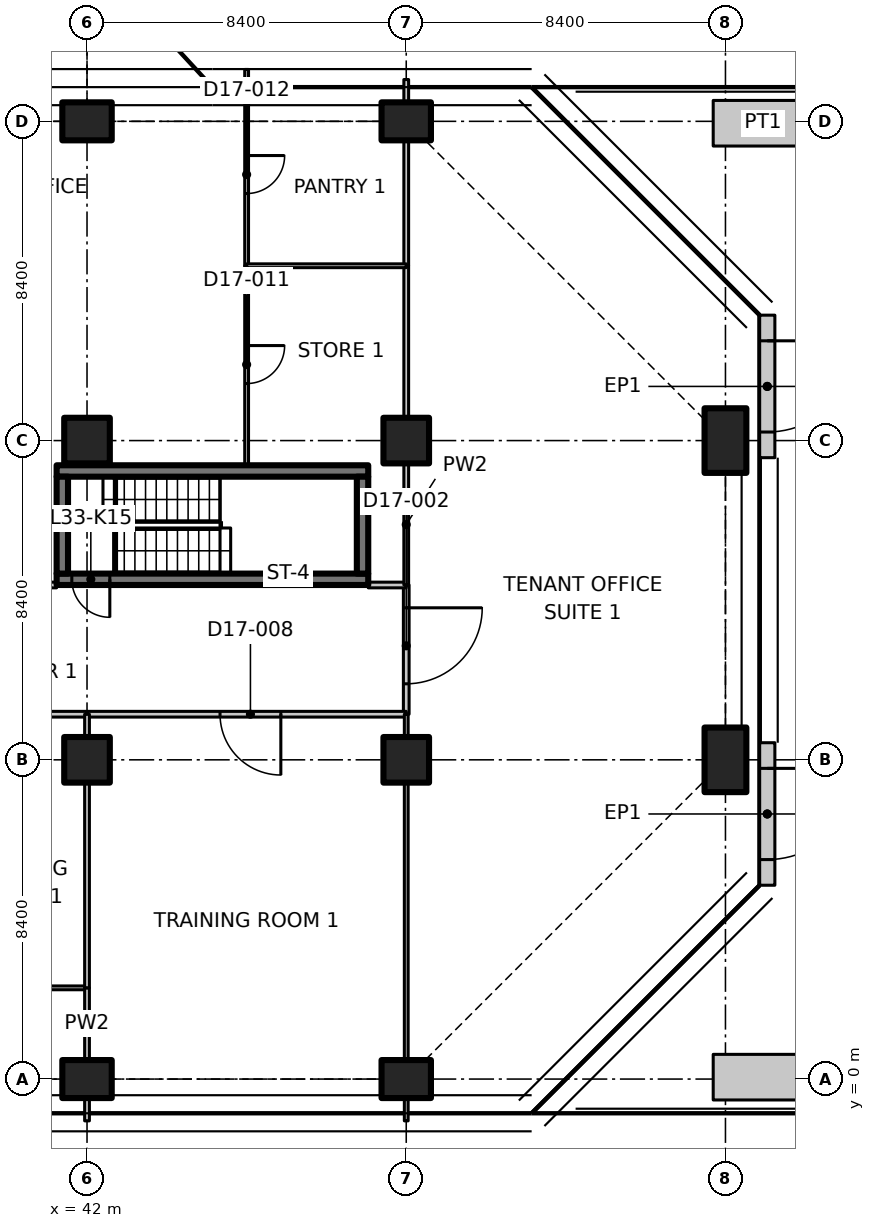
"""IFC4 building model, lengths in metres.
Left out: names, types, materials, properties, quantities, classifications, styles, units other than length and angle.
Written with IfcOpenShell. Run it as: python <this file> out.ifc"""

import sys

from ifc_helpers import new_model, si_unit, direction, frame, frame_2d, origin, origin_2d, place, context, subcontext, project, spatial, polyline, rectangle, outline, extrude, element, fill, save


model = new_model("IFC4")
c1 = context("Model", 3, precision=1e-05, world=origin(), true_north=direction((0.0, 1.0)))
c2 = subcontext(c1, "Body", "Model", "MODEL_VIEW")
j1 = project(units=[si_unit("LENGTHUNIT", "METRE"), si_unit("PLANEANGLEUNIT", "RADIAN")], contexts=[c1])
p1 = place(None, origin())
s1 = spatial("IfcSite", under=j1, at=p1, CompositionType="ELEMENT")
p2 = place(p1, origin())
s2 = spatial("IfcBuilding", under=s1, at=p2, CompositionType="ELEMENT")
p3 = place(p2, frame((0.0, 0.0, 134.9)))
s3 = spatial("IfcBuildingStorey", under=s2, at=p3, CompositionType="ELEMENT", Elevation=134.9)
p4 = place(p3, frame((42.0, 0.0, 0.0), z_axis=(0.0, 0.0, 1.0), x_axis=(0.0, 1.0, 0.0)))
e1 = element("IfcColumn", 1, at=p4, inside=s3, PredefinedType="COLUMN", context=c2, shape_type="SweptSolid", body=[
    extrude(rectangle(XDim=1.0, YDim=1.3, at=origin_2d()), origin(), (0.0, 0.0, 1.0), 3.35),
])
for number, where, z_axis, x_axis in (
    (2, (42.0, 8.4, 0.0), (0.0, 0.0, 1.0), (1.0, 0.0, 0.0)),
    (3, (42.0, 16.8, 0.0), (0.0, 0.0, 1.0), (1.0, 0.0, 0.0)),
):
    element("IfcColumn", number, at=place(p3, frame(where, z_axis=z_axis, x_axis=x_axis)), inside=s3, PredefinedType="COLUMN", context=c2, shape_type="SweptSolid", body=[
        extrude(rectangle(XDim=1.2, YDim=1.2, at=origin_2d()), origin(), (0.0, 0.0, 1.0), 3.35),
    ])
for number, where, z_axis, x_axis in (
    (4, (42.0, 25.2, 0.0), (0.0, 0.0, 1.0), (0.0, 1.0, 0.0)),
    (5, (50.4, 0.0, 0.0), (0.0, 0.0, 1.0), (0.0, 1.0, 0.0)),
):
    element("IfcColumn", number, at=place(p3, frame(where, z_axis=z_axis, x_axis=x_axis)), inside=s3, PredefinedType="COLUMN", context=c2, shape_type="SweptSolid", body=[
        extrude(rectangle(XDim=1.0, YDim=1.3, at=origin_2d()), origin(), (0.0, 0.0, 1.0), 3.35),
    ])
for number, where, z_axis, x_axis in (
    (6, (50.4, 8.4, 0.0), (0.0, 0.0, 1.0), (1.0, 0.0, 0.0)),
    (7, (50.4, 16.8, 0.0), (0.0, 0.0, 1.0), (1.0, 0.0, 0.0)),
):
    element("IfcColumn", number, at=place(p3, frame(where, z_axis=z_axis, x_axis=x_axis)), inside=s3, PredefinedType="COLUMN", context=c2, shape_type="SweptSolid", body=[
        extrude(rectangle(XDim=1.2, YDim=1.2, at=origin_2d()), origin(), (0.0, 0.0, 1.0), 3.35),
    ])
p5 = place(p3, frame((50.4, 25.2, 0.0), z_axis=(0.0, 0.0, 1.0), x_axis=(0.0, 1.0, 0.0)))
e8 = element("IfcColumn", 8, at=p5, inside=s3, PredefinedType="COLUMN", context=c2, shape_type="SweptSolid", body=[
    extrude(rectangle(XDim=1.0, YDim=1.3, at=origin_2d()), origin(), (0.0, 0.0, 1.0), 3.35),
])
for number, where, z_axis, x_axis in (
    (9, (58.8, 8.4, 0.0), (0.0, 0.0, 1.0), (1.0, 0.0, 0.0)),
    (10, (58.8, 16.8, 0.0), (0.0, 0.0, 1.0), (1.0, 0.0, 0.0)),
):
    element("IfcColumn", number, at=place(p3, frame(where, z_axis=z_axis, x_axis=x_axis)), inside=s3, PredefinedType="COLUMN", context=c2, shape_type="SweptSolid", body=[
        extrude(rectangle(XDim=1.1, YDim=1.7, at=origin_2d()), origin(), (0.0, 0.0, 1.0), 3.35),
    ])
p6 = place(p3, frame((59.9, 8.85, 0.0), z_axis=(0.0, 0.0, 1.0), x_axis=(0.0, -1.0, 0.0)))
e11 = element("IfcWall", 11, at=p6, inside=s3, PredefinedType="SOLIDWALL", context=c2, shape_type="SweptSolid", body=[
    extrude(rectangle(XDim=3.75, YDim=0.4, at=frame_2d((1.875, 0.0))), origin(), (0.0, 0.0, 1.0), 3.35),
])
p7 = place(p6, frame((0.675, 0.0, 0.0)))
e12 = element("IfcOpeningElement", 12, at=p7, cuts=e11, PredefinedType="OPENING", context=c2, shape_type="SweptSolid", body=[
    extrude(rectangle(XDim=2.4, YDim=2.7, at=frame_2d((1.2, 1.35))), frame((0.0, 0.21, 0.0), z_axis=(0.0, -1.0, 0.0), x_axis=(1.0, 0.0, 0.0)), (0.0, 0.0, 1.0), 0.42),
])
p8 = place(p3, frame((59.9, 20.1, 0.0), z_axis=(0.0, 0.0, 1.0), x_axis=(0.0, -1.0, 0.0)))
e13 = element("IfcWall", 13, at=p8, inside=s3, PredefinedType="SOLIDWALL", context=c2, shape_type="SweptSolid", body=[
    extrude(rectangle(XDim=3.75, YDim=0.4, at=frame_2d((1.875, 0.0))), origin(), (0.0, 0.0, 1.0), 3.35),
])
p9 = place(p8, frame((0.675, 0.0, 0.0)))
e14 = element("IfcOpeningElement", 14, at=p9, cuts=e13, PredefinedType="OPENING", context=c2, shape_type="SweptSolid", body=[
    extrude(rectangle(XDim=2.4, YDim=2.7, at=frame_2d((1.2, 1.35))), frame((0.0, 0.21, 0.0), z_axis=(0.0, -1.0, 0.0), x_axis=(1.0, 0.0, 0.0)), (0.0, 0.0, 1.0), 0.42),
])
p10 = place(p3, frame((61.106, 25.15, 0.0), z_axis=(0.0, 0.0, 1.0), x_axis=(-1.0, 0.0, 0.0)))
e15 = element("IfcWall", 15, at=p10, inside=s3, PredefinedType="PARAPET", context=c2, shape_type="SweptSolid", body=[
    extrude(rectangle(XDim=2.629, YDim=1.2, at=frame_2d((1.314, 0.0))), origin(), (0.0, 0.0, 1.0), 1.3),
])
p11 = place(p3, frame((58.477, 0.05, 0.0), z_axis=(0.0, 0.0, 1.0), x_axis=(1.0, 0.0, 0.0)))
e16 = element("IfcWall", 16, at=p11, inside=s3, PredefinedType="PARAPET", context=c2, shape_type="SweptSolid", body=[
    extrude(rectangle(XDim=3.478, YDim=1.2, at=frame_2d((1.739, 0.0))), origin(), (0.0, 0.0, 1.0), 1.3),
])
p12 = place(p3, frame((49.4, 13.15, 0.0), z_axis=(0.0, 0.0, 1.0), x_axis=(-1.0, 0.0, 0.0)))
e17 = element("IfcWall", 17, at=p12, inside=s3, PredefinedType="SHEAR", context=c2, shape_type="SweptSolid", body=[
    extrude(rectangle(XDim=8.2, YDim=0.3, at=frame_2d((4.1, 0.0))), origin(), (0.0, 0.0, 1.0), 3.35),
])
p13 = place(p12, frame((6.8, 0.0, 0.0)))
e18 = element("IfcOpeningElement", 18, at=p13, cuts=e17, PredefinedType="OPENING", context=c2, shape_type="SweptSolid", body=[
    extrude(rectangle(XDim=1.0, YDim=2.1, at=frame_2d((0.5, 1.05))), frame((0.0, 0.16, 0.0), z_axis=(0.0, -1.0, 0.0), x_axis=(1.0, 0.0, 0.0)), (0.0, 0.0, 1.0), 0.32),
])
p14 = place(p3, frame((41.2, 16.0, 0.0), z_axis=(0.0, 0.0, 1.0), x_axis=(1.0, 0.0, 0.0)))
e19 = element("IfcWall", 19, at=p14, inside=s3, PredefinedType="SHEAR", context=c2, shape_type="SweptSolid", body=[
    extrude(rectangle(XDim=8.2, YDim=0.3, at=frame_2d((4.1, 0.0))), origin(), (0.0, 0.0, 1.0), 3.35),
])
for number, where, z_axis, x_axis in (
    (20, (41.35, 13.3, 0.0), (0.0, 0.0, 1.0), (0.0, 1.0, 0.0)),
    (21, (49.25, 13.3, 0.0), (0.0, 0.0, 1.0), (0.0, 1.0, 0.0)),
):
    element("IfcWall", number, at=place(p3, frame(where, z_axis=z_axis, x_axis=x_axis)), inside=s3, PredefinedType="SHEAR", context=c2, shape_type="SweptSolid", body=[
        extrude(rectangle(XDim=2.55, YDim=0.3, at=frame_2d((1.275, 0.0))), origin(), (0.0, 0.0, 1.0), 3.35),
    ])
p15 = place(p3, frame((50.4, 13.0, 0.0), z_axis=(0.0, 0.0, 1.0), x_axis=(0.0, -1.0, 0.0)))
e22 = element("IfcWall", 22, at=p15, inside=s3, PredefinedType="PARTITIONING", context=c2, shape_type="SweptSolid", body=[
    extrude(rectangle(XDim=3.4, YDim=0.15, at=frame_2d((1.7, 0.0))), origin(), (0.0, 0.0, 1.0), 3.33),
])
p16 = place(p15, frame((0.6, 0.0, 0.0)))
e23 = element("IfcOpeningElement", 23, at=p16, cuts=e22, PredefinedType="OPENING", context=c2, shape_type="SweptSolid", body=[
    extrude(rectangle(XDim=2.0, YDim=2.4, at=frame_2d((1.0, 1.2))), frame((0.0, 0.085, 0.0), z_axis=(0.0, -1.0, 0.0), x_axis=(1.0, 0.0, 0.0)), (0.0, 0.0, 1.0), 0.17),
])
p17 = place(p3, frame((42.0, 9.6, 0.0), z_axis=(0.0, 0.0, 1.0), x_axis=(-1.0, 0.0, 0.0)))
e24 = element("IfcWall", 24, at=p17, inside=s3, PredefinedType="PARTITIONING", context=c2, shape_type="SweptSolid", body=[
    extrude(rectangle(XDim=4.2, YDim=0.15, at=frame_2d((2.1, 0.0))), origin(), (0.0, 0.0, 1.0), 3.33),
])
p18 = place(p3, frame((50.4, 9.6, 0.0), z_axis=(0.0, 0.0, 1.0), x_axis=(-1.0, 0.0, 0.0)))
e25 = element("IfcWall", 25, at=p18, inside=s3, PredefinedType="PARTITIONING", context=c2, shape_type="SweptSolid", body=[
    extrude(rectangle(XDim=8.4, YDim=0.15, at=frame_2d((4.2, 0.0))), origin(), (0.0, 0.0, 1.0), 3.33),
])
p19 = place(p18, frame((3.3, 0.0, 0.0)))
e26 = element("IfcOpeningElement", 26, at=p19, cuts=e25, PredefinedType="OPENING", context=c2, shape_type="SweptSolid", body=[
    extrude(rectangle(XDim=1.6, YDim=2.1, at=frame_2d((0.8, 1.05))), frame((0.0, 0.085, 0.0), z_axis=(0.0, -1.0, 0.0), x_axis=(1.0, 0.0, 0.0)), (0.0, 0.0, 1.0), 0.17),
])
p20 = place(p3, frame((33.6, 13.0, 0.0), z_axis=(0.0, 0.0, 1.0), x_axis=(1.0, 0.0, 0.0)))
e27 = element("IfcWall", 27, at=p20, inside=s3, PredefinedType="PARTITIONING", context=c2, shape_type="SweptSolid", body=[
    extrude(rectangle(XDim=7.6, YDim=0.15, at=frame_2d((3.8, 0.0))), origin(), (0.0, 0.0, 1.0), 3.33),
])
p21 = place(p20, frame((3.0, 0.0, 0.0)))
e28 = element("IfcOpeningElement", 28, at=p21, cuts=e27, PredefinedType="OPENING", context=c2, shape_type="SweptSolid", body=[
    extrude(rectangle(XDim=1.8, YDim=2.1, at=frame_2d((0.9, 1.05))), frame((0.0, 0.085, 0.0), z_axis=(0.0, -1.0, 0.0), x_axis=(1.0, 0.0, 0.0)), (0.0, 0.0, 1.0), 0.17),
])
p22 = place(p3, frame((49.4, 13.0, 0.0), z_axis=(0.0, 0.0, 1.0), x_axis=(1.0, 0.0, 0.0)))
e29 = element("IfcWall", 29, at=p22, inside=s3, PredefinedType="PARTITIONING", context=c2, shape_type="SweptSolid", body=[
    extrude(rectangle(XDim=1.0, YDim=0.15, at=frame_2d((0.5, 0.0))), origin(), (0.0, 0.0, 1.0), 3.33),
])
p23 = place(p3, frame((50.4, -1.1, 0.0), z_axis=(0.0, 0.0, 1.0), x_axis=(0.0, 1.0, 0.0)))
e30 = element("IfcWall", 30, at=p23, inside=s3, PredefinedType="PARTITIONING", context=c2, shape_type="SweptSolid", body=[
    extrude(rectangle(XDim=0.58, YDim=0.1, at=frame_2d((0.29, 0.0))), origin(), (0.0, 0.0, 1.0), 3.33),
])
p24 = place(p3, frame((50.4, 0.52, 0.0), z_axis=(0.0, 0.0, 1.0), x_axis=(0.0, 1.0, 0.0)))
e31 = element("IfcWall", 31, at=p24, inside=s3, PredefinedType="PARTITIONING", context=c2, shape_type="SweptSolid", body=[
    extrude(outline(polyline([(0.0, 0.0), (7.26, 0.0), (7.26, 3.33), (0.146, 3.33), (0.144, 2.98), (0.0, 2.98), (0.0, 0.0)])), frame((0.0, 0.05, 0.0), z_axis=(0.0, -1.0, 0.0), x_axis=(1.0, 0.0, 0.0)), (0.0, 0.0, 1.0), 0.1),
])
p25 = place(p3, frame((50.4, 9.02, 0.0), z_axis=(0.0, 0.0, 1.0), x_axis=(0.0, 1.0, 0.0)))
e32 = element("IfcWall", 32, at=p25, inside=s3, PredefinedType="PARTITIONING", context=c2, shape_type="SweptSolid", body=[
    extrude(rectangle(XDim=0.58, YDim=0.1, at=frame_2d((0.29, 0.0))), origin(), (0.0, 0.0, 1.0), 3.33),
])
p26 = place(p3, frame((50.4, 13.0, 0.0), z_axis=(0.0, 0.0, 1.0), x_axis=(0.0, 1.0, 0.0)))
e33 = element("IfcWall", 33, at=p26, inside=s3, PredefinedType="PARTITIONING", context=c2, shape_type="SweptSolid", body=[
    extrude(rectangle(XDim=3.18, YDim=0.125, at=frame_2d((1.59, 0.0))), origin(), (0.0, 0.0, 1.0), 3.33),
])
p27 = place(p3, frame((50.4, 17.42, 0.0), z_axis=(0.0, 0.0, 1.0), x_axis=(0.0, 1.0, 0.0)))
e34 = element("IfcWall", 34, at=p27, inside=s3, PredefinedType="PARTITIONING", context=c2, shape_type="SweptSolid", body=[
    extrude(rectangle(XDim=3.98, YDim=0.125, at=frame_2d((1.99, 0.0))), origin(), (0.0, 0.0, 1.0), 3.33),
])
p28 = place(p3, frame((50.4, 21.4, 0.0), z_axis=(0.0, 0.0, 1.0), x_axis=(0.0, 1.0, 0.0)))
e35 = element("IfcWall", 35, at=p28, inside=s3, PredefinedType="PARTITIONING", context=c2, shape_type="SweptSolid", body=[
    extrude(rectangle(XDim=3.28, YDim=0.125, at=frame_2d((1.64, 0.0))), origin(), (0.0, 0.0, 1.0), 2.98),
])
p29 = place(p3, frame((50.4, 25.72, 0.0), z_axis=(0.0, 0.0, 1.0), x_axis=(0.0, 1.0, 0.0)))
e36 = element("IfcWall", 36, at=p29, inside=s3, PredefinedType="PARTITIONING", context=c2, shape_type="SweptSolid", body=[
    extrude(rectangle(XDim=0.58, YDim=0.125, at=frame_2d((0.29, 0.0))), origin(), (0.0, 0.0, 1.0), 3.33),
])
p30 = place(p3, frame((37.8, 2.4, 0.0), z_axis=(0.0, 0.0, 1.0), x_axis=(1.0, 0.0, 0.0)))
e37 = element("IfcWall", 37, at=p30, inside=s3, PredefinedType="PARTITIONING", context=c2, shape_type="SweptSolid", body=[
    extrude(rectangle(XDim=4.2, YDim=0.1, at=frame_2d((2.1, 0.0))), origin(), (0.0, 0.0, 1.0), 3.33),
])
p31 = place(p3, frame((42.0, 2.4, 0.0), z_axis=(0.0, 0.0, 1.0), x_axis=(0.0, -1.0, 0.0)))
e38 = element("IfcWall", 38, at=p31, inside=s3, PredefinedType="PARTITIONING", context=c2, shape_type="SweptSolid", body=[
    extrude(rectangle(XDim=1.88, YDim=0.125, at=frame_2d((0.94, 0.0))), origin(), (0.0, 0.0, 1.0), 3.33),
])
for number, where, z_axis, x_axis in (
    (39, (42.0, -0.52, 0.0), (0.0, 0.0, 1.0), (0.0, -1.0, 0.0)),
    (40, (42.0, 9.6, 0.0), (0.0, 0.0, 1.0), (0.0, -1.0, 0.0)),
):
    element("IfcWall", number, at=place(p3, frame(where, z_axis=z_axis, x_axis=x_axis)), inside=s3, PredefinedType="PARTITIONING", context=c2, shape_type="SweptSolid", body=[
        extrude(rectangle(XDim=0.58, YDim=0.125, at=frame_2d((0.29, 0.0))), origin(), (0.0, 0.0, 1.0), 3.33),
    ])
p32 = place(p3, frame((42.0, 7.78, 0.0), z_axis=(0.0, 0.0, 1.0), x_axis=(0.0, -1.0, 0.0)))
e41 = element("IfcWall", 41, at=p32, inside=s3, PredefinedType="PARTITIONING", context=c2, shape_type="SweptSolid", body=[
    extrude(rectangle(XDim=5.38, YDim=0.125, at=frame_2d((2.69, 0.0))), origin(), (0.0, 0.0, 1.0), 3.33),
])
p33 = place(p3, frame((46.2, 21.4, 0.0), z_axis=(0.0, 0.0, 1.0), x_axis=(0.0, -1.0, 0.0)))
e42 = element("IfcWall", 42, at=p33, inside=s3, PredefinedType="PARTITIONING", context=c2, shape_type="SweptSolid", body=[
    extrude(rectangle(XDim=5.25, YDim=0.1, at=frame_2d((2.625, 0.0))), origin(), (0.0, 0.0, 1.0), 3.33),
])
p34 = place(p33, frame((2.1, 0.0, 0.0)))
e43 = element("IfcOpeningElement", 43, at=p34, cuts=e42, PredefinedType="OPENING", context=c2, shape_type="SweptSolid", body=[
    extrude(rectangle(XDim=1.0, YDim=2.1, at=frame_2d((0.5, 1.05))), frame((0.0, 0.06, 0.0), z_axis=(0.0, -1.0, 0.0), x_axis=(1.0, 0.0, 0.0)), (0.0, 0.0, 1.0), 0.12),
])
p35 = place(p3, frame((46.2, 26.565, 0.0), z_axis=(0.0, 0.0, 1.0), x_axis=(0.0, -1.0, 0.0)))
e44 = element("IfcWall", 44, at=p35, inside=s3, PredefinedType="PARTITIONING", context=c2, shape_type="SweptSolid", body=[
    extrude(outline(polyline([(0.0, 0.0), (5.165, 0.0), (5.165, 3.33), (1.815, 3.33), (1.813, 2.98), (0.917, 2.98), (0.915, 3.33), (0.265, 3.33), (0.0, 3.33), (0.0, 0.0)])), frame((0.0, 0.05, 0.0), z_axis=(0.0, -1.0, 0.0), x_axis=(1.0, 0.0, 0.0)), (0.0, 0.0, 1.0), 0.1),
])
p36 = place(p35, frame((2.265, 0.0, 0.0)))
e45 = element("IfcOpeningElement", 45, at=p36, cuts=e44, PredefinedType="OPENING", context=c2, shape_type="SweptSolid", body=[
    extrude(rectangle(XDim=1.0, YDim=2.1, at=frame_2d((0.5, 1.05))), frame((0.0, 0.06, 0.0), z_axis=(0.0, -1.0, 0.0), x_axis=(1.0, 0.0, 0.0)), (0.0, 0.0, 1.0), 0.12),
])
p37 = place(p3, frame((46.2, 21.4, 0.0), z_axis=(0.0, 0.0, 1.0), x_axis=(1.0, 0.0, 0.0)))
e46 = element("IfcWall", 46, at=p37, inside=s3, PredefinedType="PARTITIONING", context=c2, shape_type="SweptSolid", body=[
    extrude(rectangle(XDim=4.2, YDim=0.1, at=frame_2d((2.1, 0.0))), origin(), (0.0, 0.0, 1.0), 3.33),
])
p38 = place(p7, origin())
e47 = element("IfcDoor", 47, at=p38, inside=s3, OperationType="DOUBLE_DOOR_SINGLE_SWING", PredefinedType="DOOR", context=c2, shape_type="SweptSolid", body=[
    extrude(rectangle(XDim=2.4, YDim=2.7, at=frame_2d((1.2, 1.35))), frame((0.0, 0.025, 0.0), z_axis=(0.0, -1.0, 0.0), x_axis=(1.0, 0.0, 0.0)), (0.0, 0.0, 1.0), 0.05),
])
fill(e12, e47)
p39 = place(p9, origin())
e48 = element("IfcDoor", 48, at=p39, inside=s3, OperationType="DOUBLE_DOOR_SINGLE_SWING", PredefinedType="DOOR", context=c2, shape_type="SweptSolid", body=[
    extrude(rectangle(XDim=2.4, YDim=2.7, at=frame_2d((1.2, 1.35))), frame((0.0, 0.025, 0.0), z_axis=(0.0, -1.0, 0.0), x_axis=(1.0, 0.0, 0.0)), (0.0, 0.0, 1.0), 0.05),
])
fill(e14, e48)
p40 = place(p13, origin())
e49 = element("IfcDoor", 49, at=p40, inside=s3, OperationType="SINGLE_SWING_LEFT", PredefinedType="DOOR", context=c2, shape_type="SweptSolid", body=[
    extrude(rectangle(XDim=1.0, YDim=2.1, at=frame_2d((0.5, 1.05))), frame((0.0, 0.025, 0.0), z_axis=(0.0, -1.0, 0.0), x_axis=(1.0, 0.0, 0.0)), (0.0, 0.0, 1.0), 0.05),
])
fill(e18, e49)
p41 = place(p16, origin())
e50 = element("IfcDoor", 50, at=p41, inside=s3, OperationType="DOUBLE_DOOR_SINGLE_SWING", PredefinedType="DOOR", context=c2, shape_type="SweptSolid", body=[
    extrude(rectangle(XDim=2.0, YDim=2.4, at=frame_2d((1.0, 1.2))), frame((0.0, 0.025, 0.0), z_axis=(0.0, -1.0, 0.0), x_axis=(1.0, 0.0, 0.0)), (0.0, 0.0, 1.0), 0.05),
])
fill(e23, e50)
p42 = place(p19, origin())
e51 = element("IfcDoor", 51, at=p42, inside=s3, OperationType="DOUBLE_DOOR_SINGLE_SWING", PredefinedType="DOOR", context=c2, shape_type="SweptSolid", body=[
    extrude(rectangle(XDim=1.6, YDim=2.1, at=frame_2d((0.8, 1.05))), frame((0.0, 0.025, 0.0), z_axis=(0.0, -1.0, 0.0), x_axis=(1.0, 0.0, 0.0)), (0.0, 0.0, 1.0), 0.05),
])
fill(e26, e51)
p43 = place(p34, origin())
e52 = element("IfcDoor", 52, at=p43, inside=s3, OperationType="SINGLE_SWING_LEFT", PredefinedType="DOOR", context=c2, shape_type="SweptSolid", body=[
    extrude(rectangle(XDim=1.0, YDim=2.1, at=frame_2d((0.5, 1.05))), frame((0.0, 0.025, 0.0), z_axis=(0.0, -1.0, 0.0), x_axis=(1.0, 0.0, 0.0)), (0.0, 0.0, 1.0), 0.05),
])
fill(e43, e52)
p44 = place(p36, origin())
e53 = element("IfcDoor", 53, at=p44, inside=s3, OperationType="SINGLE_SWING_LEFT", PredefinedType="DOOR", context=c2, shape_type="SweptSolid", body=[
    extrude(rectangle(XDim=1.0, YDim=2.1, at=frame_2d((0.5, 1.05))), frame((0.0, 0.025, 0.0), z_axis=(0.0, -1.0, 0.0), x_axis=(1.0, 0.0, 0.0)), (0.0, 0.0, 1.0), 0.05),
])
fill(e45, e53)
save(model, sys.argv[1])
